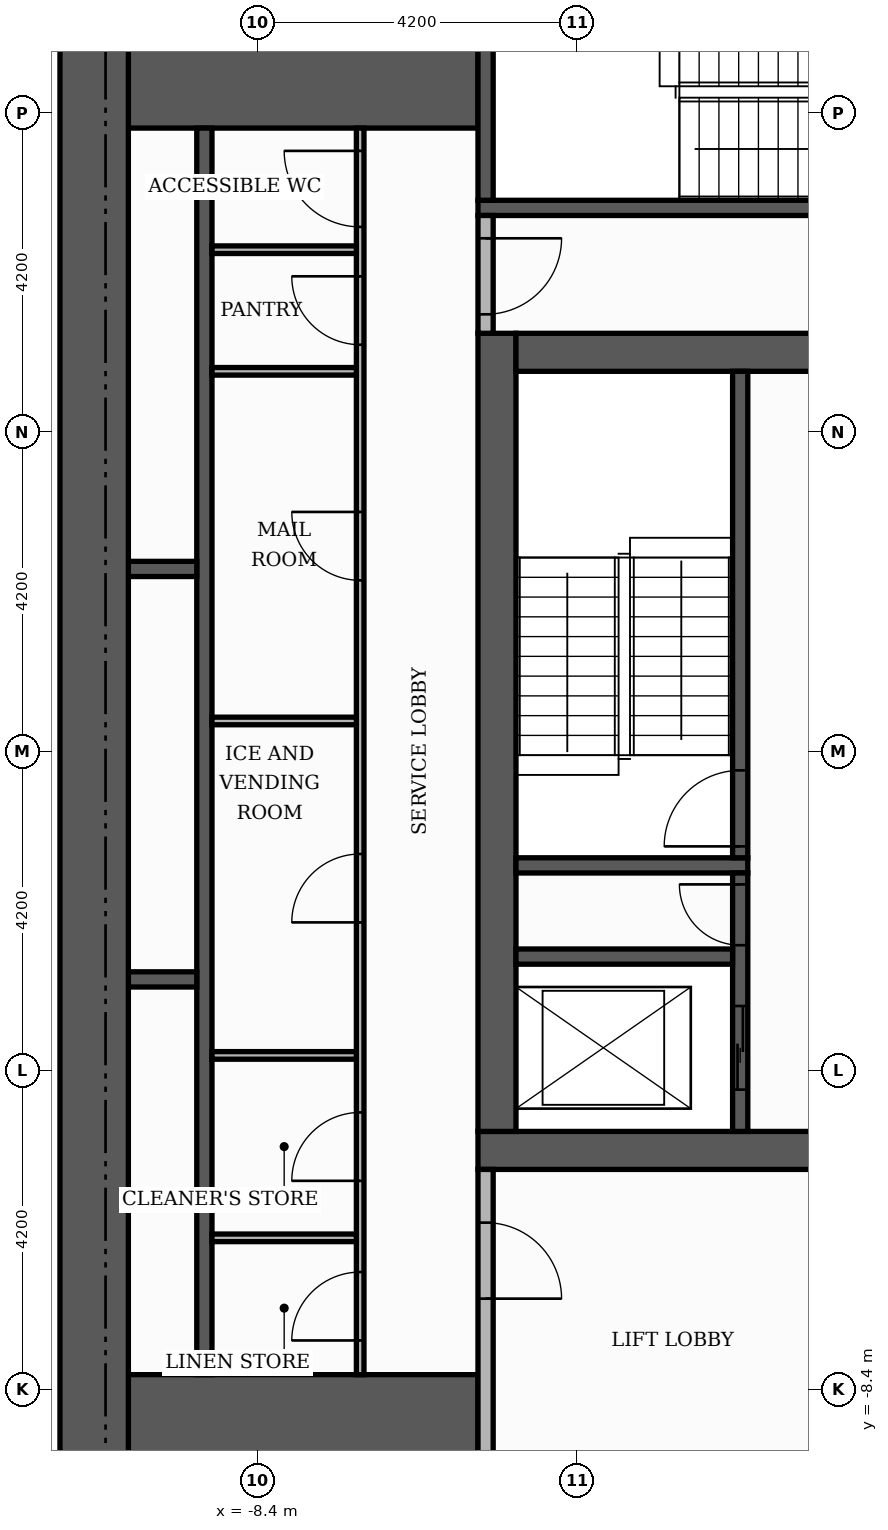
"""IFC4 building model, lengths in metres.
Left out: names, types, materials, properties, quantities, classifications, styles, units other than length and angle.
Written with IfcOpenShell. Run it as: python <this file> out.ifc"""

import sys

from ifc_helpers import new_model, si_unit, direction, frame, frame_2d, origin, place, context, subcontext, project, spatial, rectangle, extrude, element, fill, save


model = new_model("IFC4")
c1 = context("Model", 3, precision=1e-05, world=origin(), true_north=direction((0.0, 1.0)))
c2 = subcontext(c1, "Body", "Model", "MODEL_VIEW")
j1 = project(units=[si_unit("LENGTHUNIT", "METRE"), si_unit("PLANEANGLEUNIT", "RADIAN")], contexts=[c1])
p1 = place(None, origin())
s1 = spatial("IfcSite", under=j1, at=p1, CompositionType="ELEMENT")
p2 = place(p1, origin())
s2 = spatial("IfcBuilding", under=s1, at=p2, CompositionType="ELEMENT")
p3 = place(p2, frame((0.0, 0.0, 207.9)))
s3 = spatial("IfcBuildingStorey", under=s2, at=p3, CompositionType="ELEMENT", Elevation=207.9)
p4 = place(p3, frame((-5.5, -5.25, 0.0), z_axis=(0.0, 0.0, 1.0), x_axis=(1.0, 0.0, 0.0)))
e1 = element("IfcWall", 1, at=p4, inside=s3, PredefinedType="SHEAR", context=c2, shape_type="SweptSolid", body=[
    extrude(rectangle(XDim=11.0, YDim=0.5, at=frame_2d((5.5, 0.0))), origin(), (0.0, 0.0, 1.0), 3.48),
])
p5 = place(p4, frame((4.9, 0.0, 0.0)))
e2 = element("IfcOpeningElement", 2, at=p5, cuts=e1, PredefinedType="OPENING", context=c2, shape_type="SweptSolid", body=[
    extrude(rectangle(XDim=1.2, YDim=2.1, at=frame_2d((0.6, 1.05))), frame((0.0, 0.26, 0.0), z_axis=(0.0, -1.0, 0.0), x_axis=(1.0, 0.0, 0.0)), (0.0, 0.0, 1.0), 0.52),
])
p6 = place(p3, frame((-5.25, -5.0, 0.0), z_axis=(0.0, 0.0, 1.0), x_axis=(0.0, 1.0, 0.0)))
e3 = element("IfcWall", 3, at=p6, inside=s3, PredefinedType="SHEAR", context=c2, shape_type="SweptSolid", body=[
    extrude(rectangle(XDim=10.5, YDim=0.5, at=frame_2d((5.25, 0.0))), origin(), (0.0, 0.0, 1.0), 3.48),
])
p7 = place(p3, frame((-5.0, 5.25, 0.0), z_axis=(0.0, 0.0, 1.0), x_axis=(1.0, 0.0, 0.0)))
e4 = element("IfcWall", 4, at=p7, inside=s3, PredefinedType="SHEAR", context=c2, shape_type="SweptSolid", body=[
    extrude(rectangle(XDim=10.0, YDim=0.5, at=frame_2d((5.0, 0.0))), origin(), (0.0, 0.0, 1.0), 3.48),
])
p8 = place(p7, frame((4.4, 0.0, 0.0)))
e5 = element("IfcOpeningElement", 5, at=p8, cuts=e4, PredefinedType="OPENING", context=c2, shape_type="SweptSolid", body=[
    extrude(rectangle(XDim=1.2, YDim=2.1, at=frame_2d((0.6, 1.05))), frame((0.0, 0.26, 0.0), z_axis=(0.0, -1.0, 0.0), x_axis=(1.0, 0.0, 0.0)), (0.0, 0.0, 1.0), 0.52),
])
for number, where, z_axis, x_axis in (
    (6, (-10.1, -9.15, 0.0), (0.0, 0.0, 1.0), (1.0, 0.0, 0.0)),
    (7, (-10.1, 9.15, 0.0), (0.0, 0.0, 1.0), (1.0, 0.0, 0.0)),
):
    element("IfcWall", number, at=place(p3, frame(where, z_axis=z_axis, x_axis=x_axis)), inside=s3, PredefinedType="SHEAR", context=c2, shape_type="SweptSolid", body=[
        extrude(rectangle(XDim=4.6, YDim=1.9, at=frame_2d((2.3, 0.0))), origin(), (0.0, 0.0, 1.0), 3.48),
    ])
p9 = place(p3, frame((-5.0, -1.5, 0.0), z_axis=(0.0, 0.0, 1.0), x_axis=(1.0, 0.0, 0.0)))
e8 = element("IfcWall", 8, at=p9, inside=s3, PredefinedType="SHEAR", context=c2, shape_type="SweptSolid", body=[
    extrude(rectangle(XDim=3.05, YDim=0.2, at=frame_2d((1.525, 0.0))), origin(), (0.0, 0.0, 1.0), 3.48),
])
p10 = place(p3, frame((-2.05, -1.4, 0.0), z_axis=(0.0, 0.0, 1.0), x_axis=(0.0, 1.0, 0.0)))
e9 = element("IfcWall", 9, at=p10, inside=s3, PredefinedType="SHEAR", context=c2, shape_type="SweptSolid", body=[
    extrude(rectangle(XDim=6.4, YDim=0.2, at=frame_2d((3.2, 0.0))), origin(), (0.0, 0.0, 1.0), 3.48),
])
p11 = place(p10, frame((0.15, 0.0, 0.0)))
e10 = element("IfcOpeningElement", 10, at=p11, cuts=e9, PredefinedType="OPENING", context=c2, shape_type="SweptSolid", body=[
    extrude(rectangle(XDim=1.0, YDim=2.1, at=frame_2d((0.5, 1.05))), frame((0.0, 0.11, 0.0), z_axis=(0.0, -1.0, 0.0), x_axis=(1.0, 0.0, 0.0)), (0.0, 0.0, 1.0), 0.22),
])
p12 = place(p3, frame((-5.5, 7.15, 0.0), z_axis=(0.0, 0.0, 1.0), x_axis=(1.0, 0.0, 0.0)))
e11 = element("IfcWall", 11, at=p12, inside=s3, PredefinedType="SHEAR", context=c2, shape_type="SweptSolid", body=[
    extrude(rectangle(XDim=6.8, YDim=0.2, at=frame_2d((3.4, 0.0))), origin(), (0.0, 0.0, 1.0), 3.48),
])
p13 = place(p3, frame((-5.4, 7.25, 0.0), z_axis=(0.0, 0.0, 1.0), x_axis=(0.0, 1.0, 0.0)))
e12 = element("IfcWall", 12, at=p13, inside=s3, PredefinedType="SHEAR", context=c2, shape_type="SweptSolid", body=[
    extrude(rectangle(XDim=2.85, YDim=0.2, at=frame_2d((1.425, 0.0))), origin(), (0.0, 0.0, 1.0), 3.48),
])
p14 = place(p3, frame((-9.1, -8.2, 0.0), z_axis=(0.0, 0.0, 1.0), x_axis=(0.0, 1.0, 0.0)))
e13 = element("IfcWall", 13, at=p14, inside=s3, PredefinedType="SHEAR", context=c2, shape_type="SweptSolid", body=[
    extrude(rectangle(XDim=16.4, YDim=0.2, at=frame_2d((8.2, 0.0))), origin(), (0.0, 0.0, 1.0), 3.48),
])
p15 = place(p3, frame((-2.05, -5.0, 0.0), z_axis=(0.0, 0.0, 1.0), x_axis=(0.0, 1.0, 0.0)))
e14 = element("IfcWall", 14, at=p15, inside=s3, PredefinedType="SHEAR", context=c2, shape_type="SweptSolid", body=[
    extrude(rectangle(XDim=3.4, YDim=0.2, at=frame_2d((1.7, 0.0))), origin(), (0.0, 0.0, 1.0), 3.48),
])
p16 = place(p15, frame((0.55, 0.0, 0.0)))
e15 = element("IfcOpeningElement", 15, at=p16, cuts=e14, PredefinedType="OPENING", context=c2, shape_type="SweptSolid", body=[
    extrude(rectangle(XDim=1.1, YDim=2.1, at=frame_2d((0.55, 1.05))), frame((0.0, 0.11, 0.0), z_axis=(0.0, -1.0, 0.0), x_axis=(1.0, 0.0, 0.0)), (0.0, 0.0, 1.0), 0.22),
])
p17 = place(p15, frame((2.45, 0.0, 0.0)))
e16 = element("IfcOpeningElement", 16, at=p17, cuts=e14, PredefinedType="OPENING", context=c2, shape_type="SweptSolid", body=[
    extrude(rectangle(XDim=0.8, YDim=2.1, at=frame_2d((0.4, 1.05))), frame((0.0, 0.11, 0.0), z_axis=(0.0, -1.0, 0.0), x_axis=(1.0, 0.0, 0.0)), (0.0, 0.0, 1.0), 0.22),
])
p18 = place(p3, frame((-10.1, -3.0, 0.0), z_axis=(0.0, 0.0, 1.0), x_axis=(1.0, 0.0, 0.0)))
e17 = element("IfcWall", 17, at=p18, inside=s3, PredefinedType="SHEAR", context=c2, shape_type="SweptSolid", body=[
    extrude(rectangle(XDim=0.9, YDim=0.2, at=frame_2d((0.45, 0.0))), origin(), (0.0, 0.0, 1.0), 3.48),
])
p19 = place(p3, frame((-5.0, -2.7, 0.0), z_axis=(0.0, 0.0, 1.0), x_axis=(1.0, 0.0, 0.0)))
e18 = element("IfcWall", 18, at=p19, inside=s3, PredefinedType="SHEAR", context=c2, shape_type="SweptSolid", body=[
    extrude(rectangle(XDim=2.85, YDim=0.2, at=frame_2d((1.425, 0.0))), origin(), (0.0, 0.0, 1.0), 3.48),
])
p20 = place(p3, frame((-10.1, 2.4, 0.0), z_axis=(0.0, 0.0, 1.0), x_axis=(1.0, 0.0, 0.0)))
e19 = element("IfcWall", 19, at=p20, inside=s3, PredefinedType="SHEAR", context=c2, shape_type="SweptSolid", body=[
    extrude(rectangle(XDim=0.9, YDim=0.2, at=frame_2d((0.45, 0.0))), origin(), (0.0, 0.0, 1.0), 3.48),
])
p21 = place(p3, frame((-10.55, -10.1, 0.0), z_axis=(0.0, 0.0, 1.0), x_axis=(0.0, 1.0, 0.0)))
e20 = element("IfcWall", 20, at=p21, inside=s3, PredefinedType="SHEAR", context=c2, shape_type="SweptSolid", body=[
    extrude(rectangle(XDim=20.2, YDim=0.9, at=frame_2d((10.1, 0.0))), origin(), (0.0, 0.0, 1.0), 3.48),
])
p22 = place(p3, frame((-5.4, -10.1, 0.0), z_axis=(0.0, 0.0, 1.0), x_axis=(0.0, 1.0, 0.0)))
e21 = element("IfcWall", 21, at=p22, inside=s3, PredefinedType="PARTITIONING", context=c2, shape_type="SweptSolid", body=[
    extrude(rectangle(XDim=4.6, YDim=0.2, at=frame_2d((2.3, 0.0))), origin(), (0.0, 0.0, 1.0), 3.48),
])
p23 = place(p22, frame((2.9, 0.0, 0.0)))
e22 = element("IfcOpeningElement", 22, at=p23, cuts=e21, PredefinedType="OPENING", context=c2, shape_type="SweptSolid", body=[
    extrude(rectangle(XDim=1.0, YDim=2.1, at=frame_2d((0.5, 1.05))), frame((0.0, 0.11, 0.0), z_axis=(0.0, -1.0, 0.0), x_axis=(1.0, 0.0, 0.0)), (0.0, 0.0, 1.0), 0.22),
])
p24 = place(p3, frame((-7.05, -8.2, 0.0), z_axis=(0.0, 0.0, 1.0), x_axis=(0.0, 1.0, 0.0)))
e23 = element("IfcWall", 23, at=p24, inside=s3, PredefinedType="PARTITIONING", context=c2, shape_type="SweptSolid", body=[
    extrude(rectangle(XDim=16.4, YDim=0.1, at=frame_2d((8.2, 0.0))), origin(), (0.0, 0.0, 1.0), 3.48),
])
p25 = place(p24, frame((0.45, 0.0, 0.0)))
e24 = element("IfcOpeningElement", 24, at=p25, cuts=e23, PredefinedType="OPENING", context=c2, shape_type="SweptSolid", body=[
    extrude(rectangle(XDim=0.9, YDim=2.1, at=frame_2d((0.45, 1.05))), frame((0.0, 0.06, 0.0), z_axis=(0.0, -1.0, 0.0), x_axis=(1.0, 0.0, 0.0)), (0.0, 0.0, 1.0), 0.12),
])
p26 = place(p24, frame((2.55, 0.0, 0.0)))
e25 = element("IfcOpeningElement", 25, at=p26, cuts=e23, PredefinedType="OPENING", context=c2, shape_type="SweptSolid", body=[
    extrude(rectangle(XDim=0.9, YDim=2.1, at=frame_2d((0.45, 1.05))), frame((0.0, 0.06, 0.0), z_axis=(0.0, -1.0, 0.0), x_axis=(1.0, 0.0, 0.0)), (0.0, 0.0, 1.0), 0.12),
])
p27 = place(p24, frame((5.95, 0.0, 0.0)))
e26 = element("IfcOpeningElement", 26, at=p27, cuts=e23, PredefinedType="OPENING", context=c2, shape_type="SweptSolid", body=[
    extrude(rectangle(XDim=0.9, YDim=2.1, at=frame_2d((0.45, 1.05))), frame((0.0, 0.06, 0.0), z_axis=(0.0, -1.0, 0.0), x_axis=(1.0, 0.0, 0.0)), (0.0, 0.0, 1.0), 0.12),
])
p28 = place(p24, frame((10.45, 0.0, 0.0)))
e27 = element("IfcOpeningElement", 27, at=p28, cuts=e23, PredefinedType="OPENING", context=c2, shape_type="SweptSolid", body=[
    extrude(rectangle(XDim=0.9, YDim=2.1, at=frame_2d((0.45, 1.05))), frame((0.0, 0.06, 0.0), z_axis=(0.0, -1.0, 0.0), x_axis=(1.0, 0.0, 0.0)), (0.0, 0.0, 1.0), 0.12),
])
p29 = place(p24, frame((13.55, 0.0, 0.0)))
e28 = element("IfcOpeningElement", 28, at=p29, cuts=e23, PredefinedType="OPENING", context=c2, shape_type="SweptSolid", body=[
    extrude(rectangle(XDim=0.9, YDim=2.1, at=frame_2d((0.45, 1.05))), frame((0.0, 0.06, 0.0), z_axis=(0.0, -1.0, 0.0), x_axis=(1.0, 0.0, 0.0)), (0.0, 0.0, 1.0), 0.12),
])
p30 = place(p24, frame((15.1, 0.0, 0.0)))
e29 = element("IfcOpeningElement", 29, at=p30, cuts=e23, PredefinedType="OPENING", context=c2, shape_type="SweptSolid", body=[
    extrude(rectangle(XDim=1.0, YDim=2.1, at=frame_2d((0.5, 1.05))), frame((0.0, 0.06, 0.0), z_axis=(0.0, -1.0, 0.0), x_axis=(1.0, 0.0, 0.0)), (0.0, 0.0, 1.0), 0.12),
])
for number, where, z_axis, x_axis in (
    (30, (-9.0, -6.4, 0.0), (0.0, 0.0, 1.0), (1.0, 0.0, 0.0)),
    (31, (-9.0, -4.0, 0.0), (0.0, 0.0, 1.0), (1.0, 0.0, 0.0)),
    (32, (-9.0, 0.4, 0.0), (0.0, 0.0, 1.0), (1.0, 0.0, 0.0)),
    (33, (-9.0, 5.0, 0.0), (0.0, 0.0, 1.0), (1.0, 0.0, 0.0)),
):
    element("IfcWall", number, at=place(p3, frame(where, z_axis=z_axis, x_axis=x_axis)), inside=s3, PredefinedType="PARTITIONING", context=c2, shape_type="SweptSolid", body=[
        extrude(rectangle(XDim=1.9, YDim=0.1, at=frame_2d((0.95, 0.0))), origin(), (0.0, 0.0, 1.0), 3.48),
    ])
p31 = place(p3, frame((-5.4, 5.5, 0.0), z_axis=(0.0, 0.0, 1.0), x_axis=(0.0, 1.0, 0.0)))
e34 = element("IfcWall", 34, at=p31, inside=s3, PredefinedType="PARTITIONING", context=c2, shape_type="SweptSolid", body=[
    extrude(rectangle(XDim=1.55, YDim=0.2, at=frame_2d((0.775, 0.0))), origin(), (0.0, 0.0, 1.0), 3.48),
])
p32 = place(p31, frame((0.25, 0.0, 0.0)))
e35 = element("IfcOpeningElement", 35, at=p32, cuts=e34, PredefinedType="OPENING", context=c2, shape_type="SweptSolid", body=[
    extrude(rectangle(XDim=1.0, YDim=2.1, at=frame_2d((0.5, 1.05))), frame((0.0, 0.11, 0.0), z_axis=(0.0, -1.0, 0.0), x_axis=(1.0, 0.0, 0.0)), (0.0, 0.0, 1.0), 0.22),
])
p33 = place(p3, frame((-9.0, 6.6, 0.0), z_axis=(0.0, 0.0, 1.0), x_axis=(1.0, 0.0, 0.0)))
e36 = element("IfcWall", 36, at=p33, inside=s3, PredefinedType="PARTITIONING", context=c2, shape_type="SweptSolid", body=[
    extrude(rectangle(XDim=1.9, YDim=0.1, at=frame_2d((0.95, 0.0))), origin(), (0.0, 0.0, 1.0), 3.48),
])
p34 = place(p16, origin())
e37 = element("IfcDoor", 37, at=p34, inside=s3, OperationType="SLIDING_TO_LEFT", PredefinedType="DOOR", context=c2, shape_type="SweptSolid", body=[
    extrude(rectangle(XDim=1.1, YDim=2.1, at=frame_2d((0.55, 1.05))), frame((0.0, 0.025, 0.0), z_axis=(0.0, -1.0, 0.0), x_axis=(1.0, 0.0, 0.0)), (0.0, 0.0, 1.0), 0.05),
])
fill(e15, e37)
p35 = place(p11, origin())
e38 = element("IfcDoor", 38, at=p35, inside=s3, OperationType="SINGLE_SWING_LEFT", PredefinedType="DOOR", context=c2, shape_type="SweptSolid", body=[
    extrude(rectangle(XDim=1.0, YDim=2.1, at=frame_2d((0.5, 1.05))), frame((0.0, 0.025, 0.0), z_axis=(0.0, -1.0, 0.0), x_axis=(1.0, 0.0, 0.0)), (0.0, 0.0, 1.0), 0.05),
])
fill(e10, e38)
p36 = place(p17, origin())
e39 = element("IfcDoor", 39, at=p36, inside=s3, OperationType="SINGLE_SWING_RIGHT", PredefinedType="DOOR", context=c2, shape_type="SweptSolid", body=[
    extrude(rectangle(XDim=0.8, YDim=2.1, at=frame_2d((0.4, 1.05))), frame((0.0, 0.025, 0.0), z_axis=(0.0, -1.0, 0.0), x_axis=(1.0, 0.0, 0.0)), (0.0, 0.0, 1.0), 0.05),
])
fill(e16, e39)
p37 = place(p32, frame((1.0, 0.0, 0.0), z_axis=(0.0, 0.0, 1.0), x_axis=(-1.0, 0.0, 0.0)))
e40 = element("IfcDoor", 40, at=p37, inside=s3, OperationType="SINGLE_SWING_RIGHT", PredefinedType="DOOR", context=c2, shape_type="SweptSolid", body=[
    extrude(rectangle(XDim=1.0, YDim=2.1, at=frame_2d((0.5, 1.05))), frame((0.0, 0.025, 0.0), z_axis=(0.0, -1.0, 0.0), x_axis=(1.0, 0.0, 0.0)), (0.0, 0.0, 1.0), 0.05),
])
fill(e35, e40)
p38 = place(p23, frame((1.0, 0.0, 0.0), z_axis=(0.0, 0.0, 1.0), x_axis=(-1.0, 0.0, 0.0)))
e41 = element("IfcDoor", 41, at=p38, inside=s3, OperationType="SINGLE_SWING_LEFT", PredefinedType="DOOR", context=c2, shape_type="SweptSolid", body=[
    extrude(rectangle(XDim=1.0, YDim=2.1, at=frame_2d((0.5, 1.05))), frame((0.0, 0.025, 0.0), z_axis=(0.0, -1.0, 0.0), x_axis=(1.0, 0.0, 0.0)), (0.0, 0.0, 1.0), 0.05),
])
fill(e22, e41)
p39 = place(p25, origin())
e42 = element("IfcDoor", 42, at=p39, inside=s3, OperationType="SINGLE_SWING_LEFT", PredefinedType="DOOR", context=c2, shape_type="SweptSolid", body=[
    extrude(rectangle(XDim=0.9, YDim=2.1, at=frame_2d((0.45, 1.05))), frame((0.0, 0.025, 0.0), z_axis=(0.0, -1.0, 0.0), x_axis=(1.0, 0.0, 0.0)), (0.0, 0.0, 1.0), 0.05),
])
fill(e24, e42)
p40 = place(p26, origin())
e43 = element("IfcDoor", 43, at=p40, inside=s3, OperationType="SINGLE_SWING_LEFT", PredefinedType="DOOR", context=c2, shape_type="SweptSolid", body=[
    extrude(rectangle(XDim=0.9, YDim=2.1, at=frame_2d((0.45, 1.05))), frame((0.0, 0.025, 0.0), z_axis=(0.0, -1.0, 0.0), x_axis=(1.0, 0.0, 0.0)), (0.0, 0.0, 1.0), 0.05),
])
fill(e25, e43)
p41 = place(p27, origin())
e44 = element("IfcDoor", 44, at=p41, inside=s3, OperationType="SINGLE_SWING_LEFT", PredefinedType="DOOR", context=c2, shape_type="SweptSolid", body=[
    extrude(rectangle(XDim=0.9, YDim=2.1, at=frame_2d((0.45, 1.05))), frame((0.0, 0.025, 0.0), z_axis=(0.0, -1.0, 0.0), x_axis=(1.0, 0.0, 0.0)), (0.0, 0.0, 1.0), 0.05),
])
fill(e26, e44)
p42 = place(p28, origin())
e45 = element("IfcDoor", 45, at=p42, inside=s3, OperationType="SINGLE_SWING_RIGHT", PredefinedType="DOOR", context=c2, shape_type="SweptSolid", body=[
    extrude(rectangle(XDim=0.9, YDim=2.1, at=frame_2d((0.45, 1.05))), frame((0.0, 0.025, 0.0), z_axis=(0.0, -1.0, 0.0), x_axis=(1.0, 0.0, 0.0)), (0.0, 0.0, 1.0), 0.05),
])
fill(e27, e45)
p43 = place(p29, origin())
e46 = element("IfcDoor", 46, at=p43, inside=s3, OperationType="SINGLE_SWING_RIGHT", PredefinedType="DOOR", context=c2, shape_type="SweptSolid", body=[
    extrude(rectangle(XDim=0.9, YDim=2.1, at=frame_2d((0.45, 1.05))), frame((0.0, 0.025, 0.0), z_axis=(0.0, -1.0, 0.0), x_axis=(1.0, 0.0, 0.0)), (0.0, 0.0, 1.0), 0.05),
])
fill(e28, e46)
p44 = place(p30, origin())
e47 = element("IfcDoor", 47, at=p44, inside=s3, OperationType="SINGLE_SWING_RIGHT", PredefinedType="DOOR", context=c2, shape_type="SweptSolid", body=[
    extrude(rectangle(XDim=1.0, YDim=2.1, at=frame_2d((0.5, 1.05))), frame((0.0, 0.025, 0.0), z_axis=(0.0, -1.0, 0.0), x_axis=(1.0, 0.0, 0.0)), (0.0, 0.0, 1.0), 0.05),
])
fill(e29, e47)
save(model, sys.argv[1])
